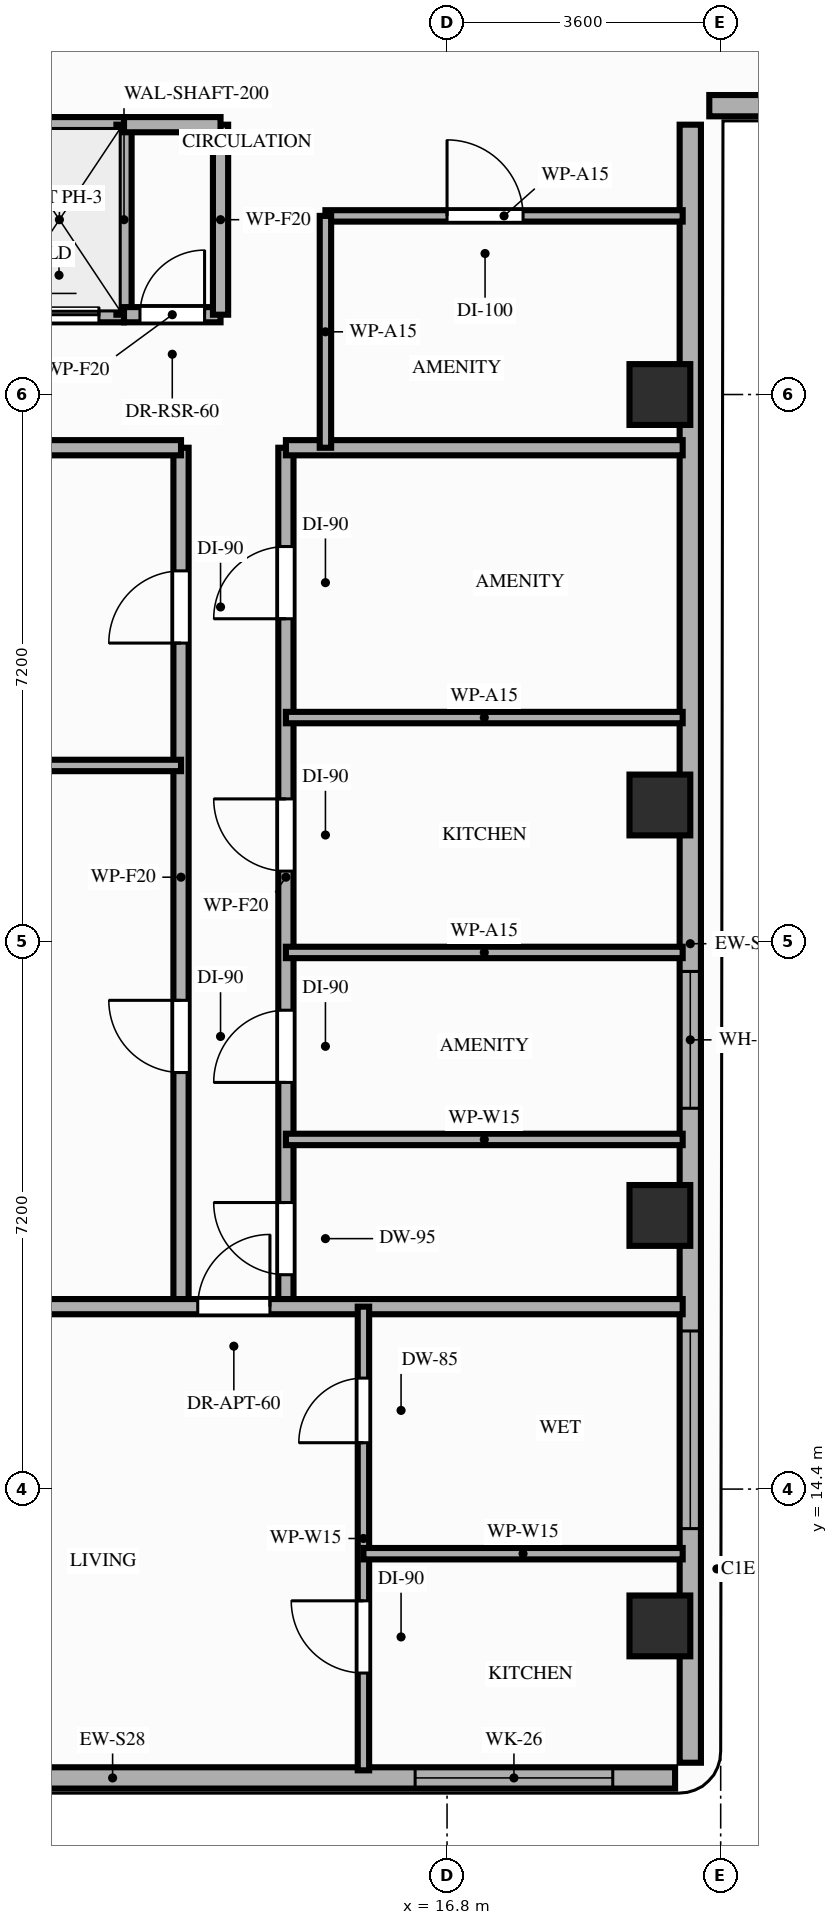
"""IFC4 building model, lengths in metres.
Left out: names, types, materials, properties, quantities, classifications, styles, units other than length and angle.
Written with IfcOpenShell. Run it as: python <this file> out.ifc"""

import sys

from ifc_helpers import new_model, si_unit, direction, frame, frame_2d, origin, origin_2d, place, context, subcontext, project, spatial, rectangle, extrude, element, fill, save


model = new_model("IFC4")
c1 = context("Model", 3, precision=1e-05, world=origin(), true_north=direction((0.0, 1.0)))
c2 = subcontext(c1, "Body", "Model", "MODEL_VIEW")
j1 = project(units=[si_unit("LENGTHUNIT", "METRE"), si_unit("PLANEANGLEUNIT", "RADIAN")], contexts=[c1])
p1 = place(None, origin())
s1 = spatial("IfcSite", under=j1, at=p1, CompositionType="ELEMENT")
p2 = place(p1, origin())
s2 = spatial("IfcBuilding", under=s1, at=p2, CompositionType="ELEMENT")
p3 = place(p2, frame((0.0, 0.0, 240.8)))
s3 = spatial("IfcBuildingStorey", under=s2, at=p3, CompositionType="ELEMENT", Elevation=240.8)
for number, where, z_axis, x_axis in (
    (1, (19.6, 12.6, 0.0), (0.0, 0.0, 1.0), (1.0, 0.0, 0.0)),
    (2, (19.6, 18.0, 0.0), (0.0, 0.0, 1.0), (1.0, 0.0, 0.0)),
    (3, (19.6, 23.4, 0.0), (0.0, 0.0, 1.0), (1.0, 0.0, 0.0)),
    (4, (19.6, 28.8, 0.0), (0.0, 0.0, 1.0), (1.0, 0.0, 0.0)),
):
    element("IfcColumn", number, at=place(p3, frame(where, z_axis=z_axis, x_axis=x_axis)), inside=s3, PredefinedType="COLUMN", context=c2, shape_type="SweptSolid", body=[
        extrude(rectangle(XDim=0.8, YDim=0.8, at=origin_2d()), origin(), (0.0, 0.0, 1.0), 3.2),
    ])
p4 = place(p3, frame((5.0, 10.6, 0.0), z_axis=(0.0, 0.0, 1.0), x_axis=(1.0, 0.0, 0.0)))
e5 = element("IfcWall", 5, at=p4, inside=s3, PredefinedType="STANDARD", context=c2, shape_type="SweptSolid", body=[
    extrude(rectangle(XDim=14.8, YDim=0.28, at=frame_2d((7.4, 0.0))), origin(), (0.0, 0.0, 1.0), 3.02),
])
p5 = place(p4, frame((11.38, 0.0, 0.85)))
e6 = element("IfcOpeningElement", 6, at=p5, cuts=e5, PredefinedType="OPENING", context=c2, shape_type="SweptSolid", body=[
    extrude(rectangle(XDim=2.6, YDim=1.92, at=frame_2d((1.3, 0.96))), frame((0.0, 0.15, 0.0), z_axis=(0.0, -1.0, 0.0), x_axis=(1.0, 0.0, 0.0)), (0.0, 0.0, 1.0), 0.3),
])
p6 = place(p3, frame((20.0, 10.8, 0.0), z_axis=(0.0, 0.0, 1.0), x_axis=(0.0, 1.0, 0.0)))
e7 = element("IfcWall", 7, at=p6, inside=s3, PredefinedType="STANDARD", context=c2, shape_type="SweptSolid", body=[
    extrude(rectangle(XDim=21.55, YDim=0.28, at=frame_2d((10.775, 0.0))), origin(), (0.0, 0.0, 1.0), 2.55),
])
p7 = place(p6, frame((3.08, 0.0, 0.85)))
e8 = element("IfcOpeningElement", 8, at=p7, cuts=e7, PredefinedType="OPENING", context=c2, shape_type="SweptSolid", body=[
    extrude(rectangle(XDim=2.6, YDim=1.45, at=frame_2d((1.3, 0.725))), frame((0.0, 0.15, 0.0), z_axis=(0.0, -1.0, 0.0), x_axis=(1.0, 0.0, 0.0)), (0.0, 0.0, 1.0), 0.3),
])
p8 = place(p6, frame((8.61, 0.0, 0.85)))
e9 = element("IfcOpeningElement", 9, at=p8, cuts=e7, PredefinedType="OPENING", context=c2, shape_type="SweptSolid", body=[
    extrude(rectangle(XDim=1.8, YDim=1.45, at=frame_2d((0.9, 0.725))), frame((0.0, 0.15, 0.0), z_axis=(0.0, -1.0, 0.0), x_axis=(1.0, 0.0, 0.0)), (0.0, 0.0, 1.0), 0.3),
])
p9 = place(p3, frame((20.25, 32.6, 0.0), z_axis=(0.0, 0.0, 1.0), x_axis=(1.0, 0.0, 0.0)))
e10 = element("IfcWall", 10, at=p9, inside=s3, PredefinedType="STANDARD", context=c2, shape_type="SweptSolid", body=[
    extrude(rectangle(XDim=7.35, YDim=0.28, at=frame_2d((3.675, 0.0))), origin(), (0.0, 0.0, 1.0), 2.55),
])
p10 = place(p3, frame((7.0, 29.85, 0.0), z_axis=(0.0, 0.0, 1.0), x_axis=(1.0, 0.0, 0.0)))
e11 = element("IfcWall", 11, at=p10, inside=s3, PredefinedType="MOVABLE", context=c2, shape_type="SweptSolid", body=[
    extrude(rectangle(XDim=5.55, YDim=0.2, at=frame_2d((2.775, 0.0))), origin(), (0.0, 0.0, 1.0), 3.02),
])
p11 = place(p10, frame((0.38, 0.0, 0.0)))
e12 = element("IfcOpeningElement", 12, at=p11, cuts=e11, PredefinedType="OPENING", context=c2, shape_type="SweptSolid", body=[
    extrude(rectangle(XDim=1.05, YDim=2.15, at=frame_2d((0.525, 1.075))), frame((0.0, 0.11, 0.0), z_axis=(0.0, -1.0, 0.0), x_axis=(1.0, 0.0, 0.0)), (0.0, 0.0, 1.0), 0.22),
])
p12 = place(p10, frame((2.28, 0.0, 0.0)))
e13 = element("IfcOpeningElement", 13, at=p12, cuts=e11, PredefinedType="OPENING", context=c2, shape_type="SweptSolid", body=[
    extrude(rectangle(XDim=1.05, YDim=2.15, at=frame_2d((0.525, 1.075))), frame((0.0, 0.11, 0.0), z_axis=(0.0, -1.0, 0.0), x_axis=(1.0, 0.0, 0.0)), (0.0, 0.0, 1.0), 0.22),
])
p13 = place(p10, frame((4.17, 0.0, 0.0)))
e14 = element("IfcOpeningElement", 14, at=p13, cuts=e11, PredefinedType="OPENING", context=c2, shape_type="SweptSolid", body=[
    extrude(rectangle(XDim=1.05, YDim=2.15, at=frame_2d((0.525, 1.075))), frame((0.0, 0.11, 0.0), z_axis=(0.0, -1.0, 0.0), x_axis=(1.0, 0.0, 0.0)), (0.0, 0.0, 1.0), 0.22),
])
p14 = place(p3, frame((7.0, 32.35, 0.0), z_axis=(0.0, 0.0, 1.0), x_axis=(1.0, 0.0, 0.0)))
e15 = element("IfcWall", 15, at=p14, inside=s3, PredefinedType="MOVABLE", context=c2, shape_type="SweptSolid", body=[
    extrude(rectangle(XDim=5.55, YDim=0.2, at=frame_2d((2.775, 0.0))), origin(), (0.0, 0.0, 1.0), 3.02),
])
p15 = place(p3, frame((12.55, 29.85, 0.0), z_axis=(0.0, 0.0, 1.0), x_axis=(0.0, 1.0, 0.0)))
e16 = element("IfcWall", 16, at=p15, inside=s3, PredefinedType="MOVABLE", context=c2, shape_type="SweptSolid", body=[
    extrude(rectangle(XDim=2.5, YDim=0.2, at=frame_2d((1.25, 0.0))), origin(), (0.0, 0.0, 1.0), 3.02),
])
p16 = place(p3, frame((12.55, 29.85, 0.0), z_axis=(0.0, 0.0, 1.0), x_axis=(1.0, 0.0, 0.0)))
e17 = element("IfcWall", 17, at=p16, inside=s3, PredefinedType="PARTITIONING", context=c2, shape_type="SweptSolid", body=[
    extrude(rectangle(XDim=1.27, YDim=0.2, at=frame_2d((0.635, 0.0))), origin(), (0.0, 0.0, 1.0), 3.02),
])
p17 = place(p16, frame((0.21, 0.0, 0.0)))
e18 = element("IfcOpeningElement", 18, at=p17, cuts=e17, PredefinedType="OPENING", context=c2, shape_type="SweptSolid", body=[
    extrude(rectangle(XDim=0.85, YDim=2.05, at=frame_2d((0.425, 1.025))), frame((0.0, 0.11, 0.0), z_axis=(0.0, -1.0, 0.0), x_axis=(1.0, 0.0, 0.0)), (0.0, 0.0, 1.0), 0.22),
])
p18 = place(p3, frame((13.82, 29.85, 0.0), z_axis=(0.0, 0.0, 1.0), x_axis=(0.0, 1.0, 0.0)))
e19 = element("IfcWall", 19, at=p18, inside=s3, PredefinedType="PARTITIONING", context=c2, shape_type="SweptSolid", body=[
    extrude(rectangle(XDim=2.5, YDim=0.2, at=frame_2d((1.25, 0.0))), origin(), (0.0, 0.0, 1.0), 3.02),
])
p19 = place(p3, frame((12.55, 32.35, 0.0), z_axis=(0.0, 0.0, 1.0), x_axis=(1.0, 0.0, 0.0)))
e20 = element("IfcWall", 20, at=p19, inside=s3, PredefinedType="PARTITIONING", context=c2, shape_type="SweptSolid", body=[
    extrude(rectangle(XDim=1.27, YDim=0.2, at=frame_2d((0.635, 0.0))), origin(), (0.0, 0.0, 1.0), 3.02),
])
p20 = place(p3, frame((13.3, 16.8, 0.0), z_axis=(0.0, 0.0, 1.0), x_axis=(0.0, 1.0, 0.0)))
e21 = element("IfcWall", 21, at=p20, inside=s3, PredefinedType="PARTITIONING", context=c2, shape_type="SweptSolid", body=[
    extrude(rectangle(XDim=11.3, YDim=0.2, at=frame_2d((5.65, 0.0))), origin(), (0.0, 0.0, 1.0), 2.55),
])
p21 = place(p20, frame((3.08, 0.0, 0.0)))
e22 = element("IfcOpeningElement", 22, at=p21, cuts=e21, PredefinedType="OPENING", context=c2, shape_type="SweptSolid", body=[
    extrude(rectangle(XDim=0.95, YDim=2.15, at=frame_2d((0.475, 1.075))), frame((0.0, 0.11, 0.0), z_axis=(0.0, -1.0, 0.0), x_axis=(1.0, 0.0, 0.0)), (0.0, 0.0, 1.0), 0.22),
])
p22 = place(p20, frame((8.73, 0.0, 0.0)))
e23 = element("IfcOpeningElement", 23, at=p22, cuts=e21, PredefinedType="OPENING", context=c2, shape_type="SweptSolid", body=[
    extrude(rectangle(XDim=0.95, YDim=2.15, at=frame_2d((0.475, 1.075))), frame((0.0, 0.11, 0.0), z_axis=(0.0, -1.0, 0.0), x_axis=(1.0, 0.0, 0.0)), (0.0, 0.0, 1.0), 0.22),
])
p23 = place(p3, frame((14.68, 16.8, 0.0), z_axis=(0.0, 0.0, 1.0), x_axis=(0.0, 1.0, 0.0)))
e24 = element("IfcWall", 24, at=p23, inside=s3, PredefinedType="PARTITIONING", context=c2, shape_type="SweptSolid", body=[
    extrude(rectangle(XDim=11.3, YDim=0.2, at=frame_2d((5.65, 0.0))), origin(), (0.0, 0.0, 1.0), 2.55),
])
p24 = place(p23, frame((0.42, 0.0, 0.0)))
e25 = element("IfcOpeningElement", 25, at=p24, cuts=e24, PredefinedType="OPENING", context=c2, shape_type="SweptSolid", body=[
    extrude(rectangle(XDim=0.95, YDim=2.1, at=frame_2d((0.475, 1.05))), frame((0.0, 0.11, 0.0), z_axis=(0.0, -1.0, 0.0), x_axis=(1.0, 0.0, 0.0)), (0.0, 0.0, 1.0), 0.22),
])
p25 = place(p23, frame((2.95, 0.0, 0.0)))
e26 = element("IfcOpeningElement", 26, at=p25, cuts=e24, PredefinedType="OPENING", context=c2, shape_type="SweptSolid", body=[
    extrude(rectangle(XDim=0.95, YDim=2.15, at=frame_2d((0.475, 1.075))), frame((0.0, 0.11, 0.0), z_axis=(0.0, -1.0, 0.0), x_axis=(1.0, 0.0, 0.0)), (0.0, 0.0, 1.0), 0.22),
])
p26 = place(p23, frame((5.73, 0.0, 0.0)))
e27 = element("IfcOpeningElement", 27, at=p26, cuts=e24, PredefinedType="OPENING", context=c2, shape_type="SweptSolid", body=[
    extrude(rectangle(XDim=0.95, YDim=2.15, at=frame_2d((0.475, 1.075))), frame((0.0, 0.11, 0.0), z_axis=(0.0, -1.0, 0.0), x_axis=(1.0, 0.0, 0.0)), (0.0, 0.0, 1.0), 0.22),
])
p27 = place(p23, frame((9.05, 0.0, 0.0)))
e28 = element("IfcOpeningElement", 28, at=p27, cuts=e24, PredefinedType="OPENING", context=c2, shape_type="SweptSolid", body=[
    extrude(rectangle(XDim=0.95, YDim=2.15, at=frame_2d((0.475, 1.075))), frame((0.0, 0.11, 0.0), z_axis=(0.0, -1.0, 0.0), x_axis=(1.0, 0.0, 0.0)), (0.0, 0.0, 1.0), 0.22),
])
p28 = place(p3, frame((4.9, 16.8, 0.0), z_axis=(0.0, 0.0, 1.0), x_axis=(1.0, 0.0, 0.0)))
e29 = element("IfcWall", 29, at=p28, inside=s3, PredefinedType="PARTITIONING", context=c2, shape_type="SweptSolid", body=[
    extrude(rectangle(XDim=15.0, YDim=0.2, at=frame_2d((7.5, 0.0))), origin(), (0.0, 0.0, 1.0), 2.55),
])
p29 = place(p28, frame((8.62, 0.0, 0.0)))
e30 = element("IfcOpeningElement", 30, at=p29, cuts=e29, PredefinedType="OPENING", context=c2, shape_type="SweptSolid", body=[
    extrude(rectangle(XDim=0.95, YDim=2.15, at=frame_2d((0.475, 1.075))), frame((0.0, 0.11, 0.0), z_axis=(0.0, -1.0, 0.0), x_axis=(1.0, 0.0, 0.0)), (0.0, 0.0, 1.0), 0.22),
])
p30 = place(p3, frame((4.9, 28.1, 0.0), z_axis=(0.0, 0.0, 1.0), x_axis=(1.0, 0.0, 0.0)))
e31 = element("IfcWall", 31, at=p30, inside=s3, PredefinedType="PARTITIONING", context=c2, shape_type="SweptSolid", body=[
    extrude(rectangle(XDim=8.4, YDim=0.2, at=frame_2d((4.2, 0.0))), origin(), (0.0, 0.0, 1.0), 2.55),
])
p31 = place(p3, frame((14.68, 28.1, 0.0), z_axis=(0.0, 0.0, 1.0), x_axis=(1.0, 0.0, 0.0)))
e32 = element("IfcWall", 32, at=p31, inside=s3, PredefinedType="PARTITIONING", context=c2, shape_type="SweptSolid", body=[
    extrude(rectangle(XDim=5.22, YDim=0.2, at=frame_2d((2.61, 0.0))), origin(), (0.0, 0.0, 1.0), 2.55),
])
p32 = place(p3, frame((15.2, 31.15, 0.0), z_axis=(0.0, 0.0, 1.0), x_axis=(1.0, 0.0, 0.0)))
e33 = element("IfcWall", 33, at=p32, inside=s3, PredefinedType="PARTITIONING", context=c2, shape_type="SweptSolid", body=[
    extrude(rectangle(XDim=4.7, YDim=0.15, at=frame_2d((2.35, 0.0))), origin(), (0.0, 0.0, 1.0), 2.55),
])
p33 = place(p32, frame((1.6, 0.0, 0.0)))
e34 = element("IfcOpeningElement", 34, at=p33, cuts=e33, PredefinedType="OPENING", context=c2, shape_type="SweptSolid", body=[
    extrude(rectangle(XDim=1.0, YDim=2.15, at=frame_2d((0.5, 1.075))), frame((0.0, 0.085, 0.0), z_axis=(0.0, -1.0, 0.0), x_axis=(1.0, 0.0, 0.0)), (0.0, 0.0, 1.0), 0.17),
])
p34 = place(p3, frame((15.2, 28.1, 0.0), z_axis=(0.0, 0.0, 1.0), x_axis=(0.0, 1.0, 0.0)))
e35 = element("IfcWall", 35, at=p34, inside=s3, PredefinedType="PARTITIONING", context=c2, shape_type="SweptSolid", body=[
    extrude(rectangle(XDim=3.05, YDim=0.15, at=frame_2d((1.525, 0.0))), origin(), (0.0, 0.0, 1.0), 2.55),
])
p35 = place(p3, frame((15.7, 10.7, 0.0), z_axis=(0.0, 0.0, 1.0), x_axis=(0.0, 1.0, 0.0)))
e36 = element("IfcWall", 36, at=p35, inside=s3, PredefinedType="PARTITIONING", context=c2, shape_type="SweptSolid", body=[
    extrude(rectangle(XDim=6.1, YDim=0.15, at=frame_2d((3.05, 0.0))), origin(), (0.0, 0.0, 1.0), 2.55),
])
p36 = place(p35, frame((1.28, 0.0, 0.0)))
e37 = element("IfcOpeningElement", 37, at=p36, cuts=e36, PredefinedType="OPENING", context=c2, shape_type="SweptSolid", body=[
    extrude(rectangle(XDim=0.95, YDim=2.15, at=frame_2d((0.475, 1.075))), frame((0.0, 0.085, 0.0), z_axis=(0.0, -1.0, 0.0), x_axis=(1.0, 0.0, 0.0)), (0.0, 0.0, 1.0), 0.17),
])
p37 = place(p35, frame((4.31, 0.0, 0.0)))
e38 = element("IfcOpeningElement", 38, at=p37, cuts=e36, PredefinedType="OPENING", context=c2, shape_type="SweptSolid", body=[
    extrude(rectangle(XDim=0.85, YDim=2.1, at=frame_2d((0.425, 1.05))), frame((0.0, 0.085, 0.0), z_axis=(0.0, -1.0, 0.0), x_axis=(1.0, 0.0, 0.0)), (0.0, 0.0, 1.0), 0.17),
])
p38 = place(p3, frame((15.7, 13.55, 0.0), z_axis=(0.0, 0.0, 1.0), x_axis=(1.0, 0.0, 0.0)))
e39 = element("IfcWall", 39, at=p38, inside=s3, PredefinedType="PARTITIONING", context=c2, shape_type="SweptSolid", body=[
    extrude(rectangle(XDim=4.2, YDim=0.15, at=frame_2d((2.1, 0.0))), origin(), (0.0, 0.0, 1.0), 2.55),
])
p39 = place(p3, frame((4.9, 23.92, 0.0), z_axis=(0.0, 0.0, 1.0), x_axis=(1.0, 0.0, 0.0)))
e40 = element("IfcWall", 40, at=p39, inside=s3, PredefinedType="PARTITIONING", context=c2, shape_type="SweptSolid", body=[
    extrude(rectangle(XDim=8.4, YDim=0.15, at=frame_2d((4.2, 0.0))), origin(), (0.0, 0.0, 1.0), 2.55),
])
for number, where, z_axis, x_axis in (
    (41, (14.68, 19.0, 0.0), (0.0, 0.0, 1.0), (1.0, 0.0, 0.0)),
    (42, (14.68, 21.46, 0.0), (0.0, 0.0, 1.0), (1.0, 0.0, 0.0)),
    (43, (14.68, 24.55, 0.0), (0.0, 0.0, 1.0), (1.0, 0.0, 0.0)),
):
    element("IfcWall", number, at=place(p3, frame(where, z_axis=z_axis, x_axis=x_axis)), inside=s3, PredefinedType="PARTITIONING", context=c2, shape_type="SweptSolid", body=[
        extrude(rectangle(XDim=5.22, YDim=0.15, at=frame_2d((2.61, 0.0))), origin(), (0.0, 0.0, 1.0), 2.55),
    ])
p40 = place(p5, origin())
e44 = element("IfcWindow", 44, at=p40, inside=s3, PartitioningType="SINGLE_PANEL", PredefinedType="WINDOW", context=c2, shape_type="SweptSolid", body=[
    extrude(rectangle(XDim=2.6, YDim=1.92, at=frame_2d((1.3, 0.96))), frame((0.0, 0.03, 0.0), z_axis=(0.0, -1.0, 0.0), x_axis=(1.0, 0.0, 0.0)), (0.0, 0.0, 1.0), 0.06),
])
fill(e6, e44)
p41 = place(p7, origin())
e45 = element("IfcWindow", 45, at=p41, inside=s3, PartitioningType="SINGLE_PANEL", PredefinedType="WINDOW", context=c2, shape_type="SweptSolid", body=[
    extrude(rectangle(XDim=2.6, YDim=1.45, at=frame_2d((1.3, 0.725))), frame((0.0, 0.03, 0.0), z_axis=(0.0, -1.0, 0.0), x_axis=(1.0, 0.0, 0.0)), (0.0, 0.0, 1.0), 0.06),
])
fill(e8, e45)
p42 = place(p8, origin())
e46 = element("IfcWindow", 46, at=p42, inside=s3, PartitioningType="SINGLE_PANEL", PredefinedType="WINDOW", context=c2, shape_type="SweptSolid", body=[
    extrude(rectangle(XDim=1.8, YDim=1.45, at=frame_2d((0.9, 0.725))), frame((0.0, 0.03, 0.0), z_axis=(0.0, -1.0, 0.0), x_axis=(1.0, 0.0, 0.0)), (0.0, 0.0, 1.0), 0.06),
])
fill(e9, e46)
p43 = place(p13, origin())
e47 = element("IfcDoor", 47, at=p43, inside=s3, OperationType="SLIDING_TO_LEFT", PredefinedType="DOOR", context=c2, shape_type="SweptSolid", body=[
    extrude(rectangle(XDim=1.05, YDim=2.15, at=frame_2d((0.525, 1.075))), frame((0.0, 0.025, 0.0), z_axis=(0.0, -1.0, 0.0), x_axis=(1.0, 0.0, 0.0)), (0.0, 0.0, 1.0), 0.05),
])
fill(e14, e47)
p44 = place(p17, origin())
e48 = element("IfcDoor", 48, at=p44, inside=s3, OperationType="SINGLE_SWING_RIGHT", PredefinedType="DOOR", context=c2, shape_type="SweptSolid", body=[
    extrude(rectangle(XDim=0.85, YDim=2.05, at=frame_2d((0.425, 1.025))), frame((0.0, 0.025, 0.0), z_axis=(0.0, -1.0, 0.0), x_axis=(1.0, 0.0, 0.0)), (0.0, 0.0, 1.0), 0.05),
])
fill(e18, e48)
p45 = place(p33, origin())
e49 = element("IfcDoor", 49, at=p45, inside=s3, OperationType="SINGLE_SWING_LEFT", PredefinedType="DOOR", context=c2, shape_type="SweptSolid", body=[
    extrude(rectangle(XDim=1.0, YDim=2.15, at=frame_2d((0.5, 1.075))), frame((0.0, 0.025, 0.0), z_axis=(0.0, -1.0, 0.0), x_axis=(1.0, 0.0, 0.0)), (0.0, 0.0, 1.0), 0.05),
])
fill(e34, e49)
p46 = place(p29, origin())
e50 = element("IfcDoor", 50, at=p46, inside=s3, OperationType="SINGLE_SWING_RIGHT", PredefinedType="DOOR", context=c2, shape_type="SweptSolid", body=[
    extrude(rectangle(XDim=0.95, YDim=2.15, at=frame_2d((0.475, 1.075))), frame((0.0, 0.025, 0.0), z_axis=(0.0, -1.0, 0.0), x_axis=(1.0, 0.0, 0.0)), (0.0, 0.0, 1.0), 0.05),
])
fill(e30, e50)
p47 = place(p36, origin())
e51 = element("IfcDoor", 51, at=p47, inside=s3, OperationType="SINGLE_SWING_RIGHT", PredefinedType="DOOR", context=c2, shape_type="SweptSolid", body=[
    extrude(rectangle(XDim=0.95, YDim=2.15, at=frame_2d((0.475, 1.075))), frame((0.0, 0.025, 0.0), z_axis=(0.0, -1.0, 0.0), x_axis=(1.0, 0.0, 0.0)), (0.0, 0.0, 1.0), 0.05),
])
fill(e37, e51)
p48 = place(p37, origin())
e52 = element("IfcDoor", 52, at=p48, inside=s3, OperationType="SINGLE_SWING_LEFT", PredefinedType="DOOR", context=c2, shape_type="SweptSolid", body=[
    extrude(rectangle(XDim=0.85, YDim=2.1, at=frame_2d((0.425, 1.05))), frame((0.0, 0.025, 0.0), z_axis=(0.0, -1.0, 0.0), x_axis=(1.0, 0.0, 0.0)), (0.0, 0.0, 1.0), 0.05),
])
fill(e38, e52)
p49 = place(p21, origin())
e53 = element("IfcDoor", 53, at=p49, inside=s3, OperationType="SINGLE_SWING_RIGHT", PredefinedType="DOOR", context=c2, shape_type="SweptSolid", body=[
    extrude(rectangle(XDim=0.95, YDim=2.15, at=frame_2d((0.475, 1.075))), frame((0.0, 0.025, 0.0), z_axis=(0.0, -1.0, 0.0), x_axis=(1.0, 0.0, 0.0)), (0.0, 0.0, 1.0), 0.05),
])
fill(e22, e53)
p50 = place(p22, origin())
e54 = element("IfcDoor", 54, at=p50, inside=s3, OperationType="SINGLE_SWING_LEFT", PredefinedType="DOOR", context=c2, shape_type="SweptSolid", body=[
    extrude(rectangle(XDim=0.95, YDim=2.15, at=frame_2d((0.475, 1.075))), frame((0.0, 0.025, 0.0), z_axis=(0.0, -1.0, 0.0), x_axis=(1.0, 0.0, 0.0)), (0.0, 0.0, 1.0), 0.05),
])
fill(e23, e54)
p51 = place(p24, origin())
e55 = element("IfcDoor", 55, at=p51, inside=s3, OperationType="SINGLE_SWING_RIGHT", PredefinedType="DOOR", context=c2, shape_type="SweptSolid", body=[
    extrude(rectangle(XDim=0.95, YDim=2.1, at=frame_2d((0.475, 1.05))), frame((0.0, 0.025, 0.0), z_axis=(0.0, -1.0, 0.0), x_axis=(1.0, 0.0, 0.0)), (0.0, 0.0, 1.0), 0.05),
])
fill(e25, e55)
p52 = place(p25, origin())
e56 = element("IfcDoor", 56, at=p52, inside=s3, OperationType="SINGLE_SWING_LEFT", PredefinedType="DOOR", context=c2, shape_type="SweptSolid", body=[
    extrude(rectangle(XDim=0.95, YDim=2.15, at=frame_2d((0.475, 1.075))), frame((0.0, 0.025, 0.0), z_axis=(0.0, -1.0, 0.0), x_axis=(1.0, 0.0, 0.0)), (0.0, 0.0, 1.0), 0.05),
])
fill(e26, e56)
p53 = place(p26, origin())
e57 = element("IfcDoor", 57, at=p53, inside=s3, OperationType="SINGLE_SWING_RIGHT", PredefinedType="DOOR", context=c2, shape_type="SweptSolid", body=[
    extrude(rectangle(XDim=0.95, YDim=2.15, at=frame_2d((0.475, 1.075))), frame((0.0, 0.025, 0.0), z_axis=(0.0, -1.0, 0.0), x_axis=(1.0, 0.0, 0.0)), (0.0, 0.0, 1.0), 0.05),
])
fill(e27, e57)
p54 = place(p27, origin())
e58 = element("IfcDoor", 58, at=p54, inside=s3, OperationType="SINGLE_SWING_LEFT", PredefinedType="DOOR", context=c2, shape_type="SweptSolid", body=[
    extrude(rectangle(XDim=0.95, YDim=2.15, at=frame_2d((0.475, 1.075))), frame((0.0, 0.025, 0.0), z_axis=(0.0, -1.0, 0.0), x_axis=(1.0, 0.0, 0.0)), (0.0, 0.0, 1.0), 0.05),
])
fill(e28, e58)
save(model, sys.argv[1])
